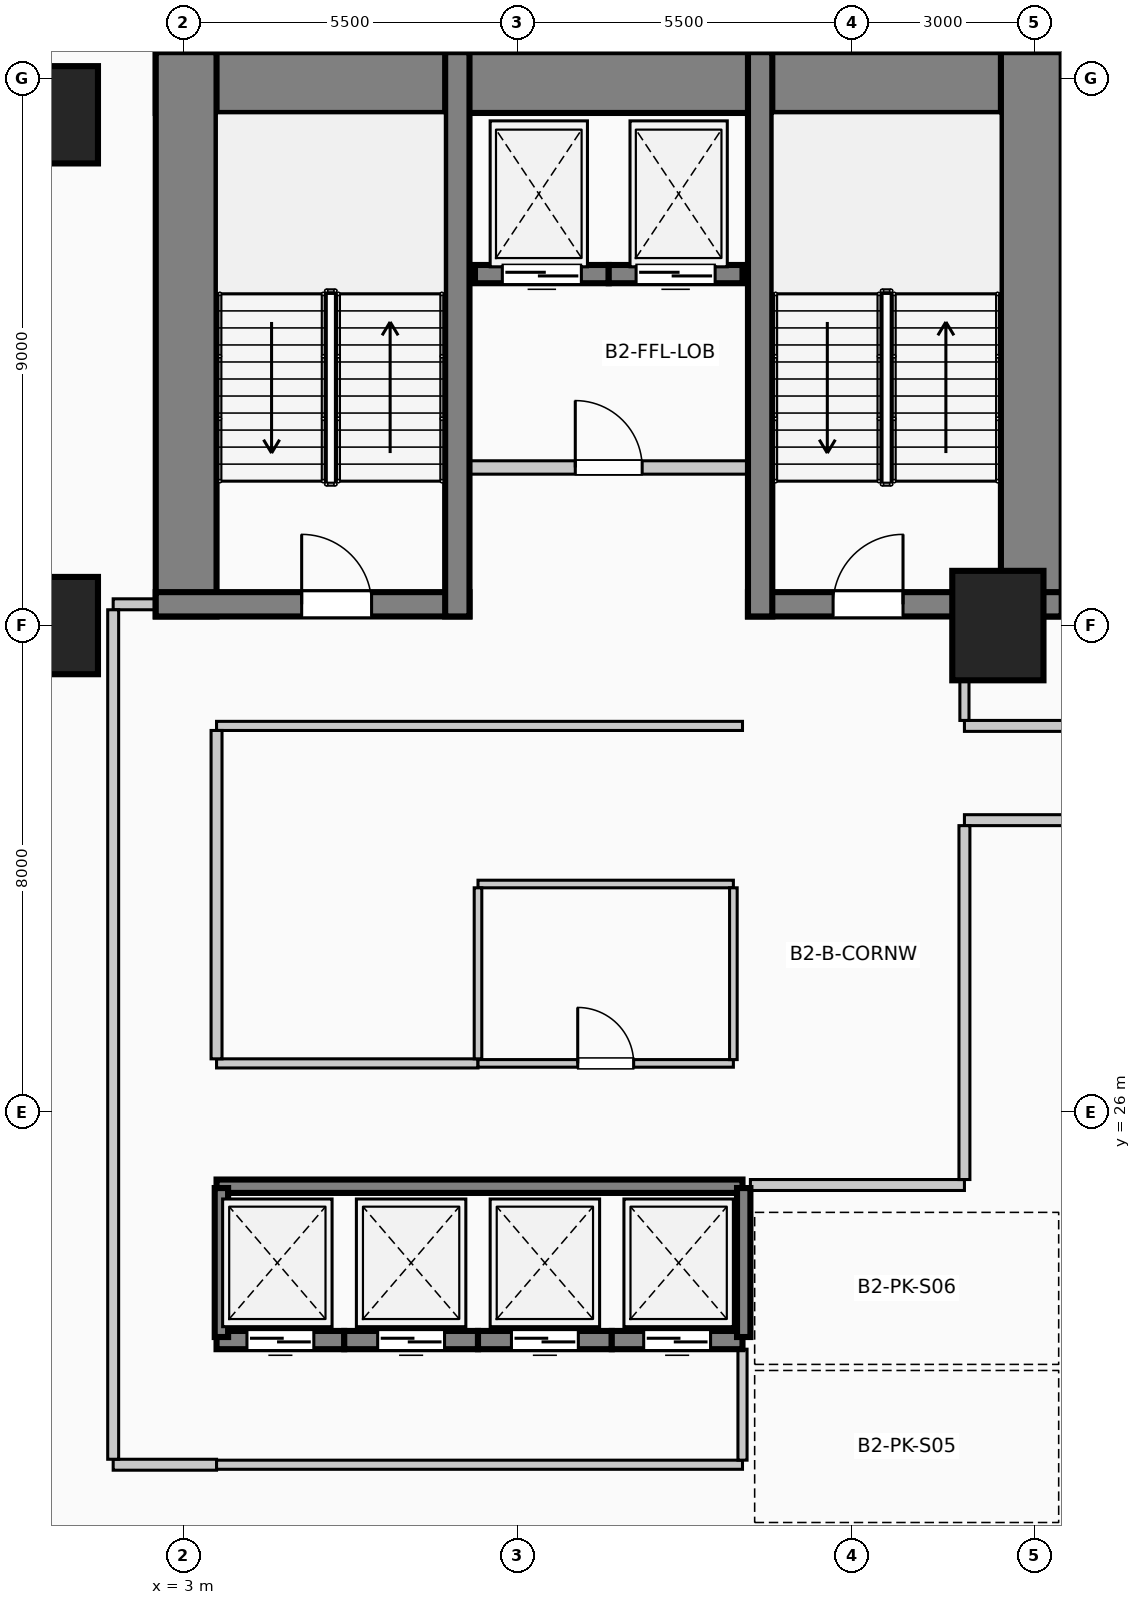
"""IFC4 building model, lengths in metres.
Left out: names, types, materials, properties, quantities, classifications, styles, units other than length and angle.
Written with IfcOpenShell. Run it as: python <this file> out.ifc"""

import sys

from ifc_helpers import new_model, si_unit, direction, frame, frame_2d, origin, origin_2d, place, context, subcontext, project, spatial, rectangle, extrude, element, fill, save


model = new_model("IFC4")
c1 = context("Model", 3, precision=1e-05, world=origin(), true_north=direction((0.0, 1.0)))
c2 = subcontext(c1, "Body", "Model", "MODEL_VIEW")
j1 = project(units=[si_unit("LENGTHUNIT", "METRE"), si_unit("PLANEANGLEUNIT", "RADIAN")], contexts=[c1])
p1 = place(None, origin())
s1 = spatial("IfcSite", under=j1, at=p1, CompositionType="ELEMENT")
p2 = place(p1, origin())
s2 = spatial("IfcBuilding", under=s1, at=p2, CompositionType="ELEMENT")
p3 = place(p2, frame((0.0, 0.0, -9.0)))
s3 = spatial("IfcBuildingStorey", under=s2, at=p3, CompositionType="ELEMENT", Elevation=-9.0)
p4 = place(p3, frame((2.55, 42.93, 0.0), z_axis=(0.0, 0.0, 1.0), x_axis=(1.0, 0.0, 0.0)))
e1 = element("IfcWall", 1, at=p4, inside=s3, PredefinedType="SHEAR", context=c2, shape_type="SweptSolid", body=[
    extrude(rectangle(XDim=14.9, YDim=1.0, at=frame_2d((7.45, 0.0))), origin(), (0.0, 0.0, 1.0), 4.5),
])
for number, where, z_axis, x_axis in (
    (2, (3.05, 34.15, 0.0), (0.0, 0.0, 1.0), (0.0, 1.0, 0.0)),
    (3, (16.95, 34.15, 0.0), (0.0, 0.0, 1.0), (0.0, 1.0, 0.0)),
):
    element("IfcWall", number, at=place(p3, frame(where, z_axis=z_axis, x_axis=x_axis)), inside=s3, PredefinedType="SHEAR", context=c2, shape_type="SweptSolid", body=[
        extrude(rectangle(XDim=9.28, YDim=1.0, at=frame_2d((4.64, 0.0))), origin(), (0.0, 0.0, 1.0), 4.5),
    ])
p5 = place(p3, frame((2.55, 34.35, 0.0), z_axis=(0.0, 0.0, 1.0), x_axis=(1.0, 0.0, 0.0)))
e4 = element("IfcWall", 4, at=p5, inside=s3, PredefinedType="SHEAR", context=c2, shape_type="SweptSolid", body=[
    extrude(rectangle(XDim=5.16, YDim=0.4, at=frame_2d((2.58, 0.0))), origin(), (0.0, 0.0, 1.0), 4.5),
])
p6 = place(p5, frame((2.4, 0.0, 0.0)))
e5 = element("IfcOpeningElement", 5, at=p6, cuts=e4, PredefinedType="OPENING", context=c2, shape_type="SweptSolid", body=[
    extrude(rectangle(XDim=1.15, YDim=2.2, at=frame_2d((0.575, 1.1))), frame((0.0, 0.21, 0.0), z_axis=(0.0, -1.0, 0.0), x_axis=(1.0, 0.0, 0.0)), (0.0, 0.0, 1.0), 0.42),
])
p7 = place(p3, frame((12.29, 34.35, 0.0), z_axis=(0.0, 0.0, 1.0), x_axis=(1.0, 0.0, 0.0)))
e6 = element("IfcWall", 6, at=p7, inside=s3, PredefinedType="SHEAR", context=c2, shape_type="SweptSolid", body=[
    extrude(rectangle(XDim=5.16, YDim=0.4, at=frame_2d((2.58, 0.0))), origin(), (0.0, 0.0, 1.0), 4.5),
])
p8 = place(p7, frame((1.4, 0.0, 0.0)))
e7 = element("IfcOpeningElement", 7, at=p8, cuts=e6, PredefinedType="OPENING", context=c2, shape_type="SweptSolid", body=[
    extrude(rectangle(XDim=1.15, YDim=2.2, at=frame_2d((0.575, 1.1))), frame((0.0, 0.21, 0.0), z_axis=(0.0, -1.0, 0.0), x_axis=(1.0, 0.0, 0.0)), (0.0, 0.0, 1.0), 0.42),
])
for number, where, z_axis, x_axis in (
    (8, (7.51, 34.15, 0.0), (0.0, 0.0, 1.0), (0.0, 1.0, 0.0)),
    (9, (12.49, 34.15, 0.0), (0.0, 0.0, 1.0), (0.0, 1.0, 0.0)),
):
    element("IfcWall", number, at=place(p3, frame(where, z_axis=z_axis, x_axis=x_axis)), inside=s3, PredefinedType="SHEAR", context=c2, shape_type="SweptSolid", body=[
        extrude(rectangle(XDim=9.28, YDim=0.4, at=frame_2d((4.64, 0.0))), origin(), (0.0, 0.0, 1.0), 4.5),
    ])
for number, where, z_axis, x_axis in (
    (10, (0.6, 34.0, 0.0), (0.0, 0.0, 1.0), (0.0, 1.0, 0.0)),
    (11, (0.6, 42.4, 0.0), (0.0, 0.0, 1.0), (0.0, 1.0, 0.0)),
):
    element("IfcColumn", number, at=place(p3, frame(where, z_axis=z_axis, x_axis=x_axis)), inside=s3, PredefinedType="COLUMN", context=c2, shape_type="SweptSolid", body=[
        extrude(rectangle(XDim=1.6, YDim=2.0, at=origin_2d()), origin(), (0.0, 0.0, 1.0), 4.5),
    ])
p9 = place(p3, frame((16.4, 34.0, 0.0), z_axis=(0.0, 0.0, 1.0), x_axis=(1.0, 0.0, 0.0)))
e12 = element("IfcColumn", 12, at=p9, inside=s3, PredefinedType="COLUMN", context=c2, shape_type="SweptSolid", body=[
    extrude(rectangle(XDim=1.5, YDim=1.8, at=origin_2d()), origin(), (0.0, 0.0, 1.0), 4.5),
])
p10 = place(p3, frame((5.65, 22.25, 0.0), z_axis=(0.0, 0.0, 1.0), x_axis=(-1.0, 0.0, 0.0)))
e13 = element("IfcWall", 13, at=p10, inside=s3, PredefinedType="SOLIDWALL", context=c2, shape_type="SweptSolid", body=[
    extrude(rectangle(XDim=2.1, YDim=0.3, at=frame_2d((1.05, 0.0))), origin(), (0.0, 0.0, 1.0), 4.5),
])
p11 = place(p10, frame((0.5, 0.0, 0.0)))
e14 = element("IfcOpeningElement", 14, at=p11, cuts=e13, PredefinedType="OPENING", context=c2, shape_type="SweptSolid", body=[
    extrude(rectangle(XDim=1.1, YDim=2.2, at=frame_2d((0.55, 1.1))), frame((0.0, 0.16, 0.0), z_axis=(0.0, -1.0, 0.0), x_axis=(1.0, 0.0, 0.0)), (0.0, 0.0, 1.0), 0.32),
])
p12 = place(p3, frame((7.85, 22.25, 0.0), z_axis=(0.0, 0.0, 1.0), x_axis=(-1.0, 0.0, 0.0)))
e15 = element("IfcWall", 15, at=p12, inside=s3, PredefinedType="SOLIDWALL", context=c2, shape_type="SweptSolid", body=[
    extrude(rectangle(XDim=2.2, YDim=0.3, at=frame_2d((1.1, 0.0))), origin(), (0.0, 0.0, 1.0), 4.5),
])
p13 = place(p12, frame((0.55, 0.0, 0.0)))
e16 = element("IfcOpeningElement", 16, at=p13, cuts=e15, PredefinedType="OPENING", context=c2, shape_type="SweptSolid", body=[
    extrude(rectangle(XDim=1.1, YDim=2.2, at=frame_2d((0.55, 1.1))), frame((0.0, 0.16, 0.0), z_axis=(0.0, -1.0, 0.0), x_axis=(1.0, 0.0, 0.0)), (0.0, 0.0, 1.0), 0.32),
])
p14 = place(p3, frame((10.05, 22.25, 0.0), z_axis=(0.0, 0.0, 1.0), x_axis=(-1.0, 0.0, 0.0)))
e17 = element("IfcWall", 17, at=p14, inside=s3, PredefinedType="SOLIDWALL", context=c2, shape_type="SweptSolid", body=[
    extrude(rectangle(XDim=2.2, YDim=0.3, at=frame_2d((1.1, 0.0))), origin(), (0.0, 0.0, 1.0), 4.5),
])
p15 = place(p14, frame((0.55, 0.0, 0.0)))
e18 = element("IfcOpeningElement", 18, at=p15, cuts=e17, PredefinedType="OPENING", context=c2, shape_type="SweptSolid", body=[
    extrude(rectangle(XDim=1.1, YDim=2.2, at=frame_2d((0.55, 1.1))), frame((0.0, 0.16, 0.0), z_axis=(0.0, -1.0, 0.0), x_axis=(1.0, 0.0, 0.0)), (0.0, 0.0, 1.0), 0.32),
])
p16 = place(p3, frame((12.2, 22.25, 0.0), z_axis=(0.0, 0.0, 1.0), x_axis=(-1.0, 0.0, 0.0)))
e19 = element("IfcWall", 19, at=p16, inside=s3, PredefinedType="SOLIDWALL", context=c2, shape_type="SweptSolid", body=[
    extrude(rectangle(XDim=2.15, YDim=0.3, at=frame_2d((1.075, 0.0))), origin(), (0.0, 0.0, 1.0), 4.5),
])
p17 = place(p16, frame((0.525, 0.0, 0.0)))
e20 = element("IfcOpeningElement", 20, at=p17, cuts=e19, PredefinedType="OPENING", context=c2, shape_type="SweptSolid", body=[
    extrude(rectangle(XDim=1.1, YDim=2.2, at=frame_2d((0.55, 1.1))), frame((0.0, 0.16, 0.0), z_axis=(0.0, -1.0, 0.0), x_axis=(1.0, 0.0, 0.0)), (0.0, 0.0, 1.0), 0.32),
])
p18 = place(p3, frame((10.0, 39.78, 0.0), z_axis=(0.0, 0.0, 1.0), x_axis=(-1.0, 0.0, 0.0)))
e21 = element("IfcWall", 21, at=p18, inside=s3, PredefinedType="SOLIDWALL", context=c2, shape_type="SweptSolid", body=[
    extrude(rectangle(XDim=2.2, YDim=0.3, at=frame_2d((1.1, 0.0))), origin(), (0.0, 0.0, 1.0), 4.5),
])
p19 = place(p18, frame((0.45, 0.0, 0.0)))
e22 = element("IfcOpeningElement", 22, at=p19, cuts=e21, PredefinedType="OPENING", context=c2, shape_type="SweptSolid", body=[
    extrude(rectangle(XDim=1.3, YDim=2.25, at=frame_2d((0.65, 1.125))), frame((0.0, 0.16, 0.0), z_axis=(0.0, -1.0, 0.0), x_axis=(1.0, 0.0, 0.0)), (0.0, 0.0, 1.0), 0.32),
])
p20 = place(p3, frame((12.2, 39.78, 0.0), z_axis=(0.0, 0.0, 1.0), x_axis=(-1.0, 0.0, 0.0)))
e23 = element("IfcWall", 23, at=p20, inside=s3, PredefinedType="SOLIDWALL", context=c2, shape_type="SweptSolid", body=[
    extrude(rectangle(XDim=2.2, YDim=0.3, at=frame_2d((1.1, 0.0))), origin(), (0.0, 0.0, 1.0), 4.5),
])
p21 = place(p20, frame((0.45, 0.0, 0.0)))
e24 = element("IfcOpeningElement", 24, at=p21, cuts=e23, PredefinedType="OPENING", context=c2, shape_type="SweptSolid", body=[
    extrude(rectangle(XDim=1.3, YDim=2.25, at=frame_2d((0.65, 1.125))), frame((0.0, 0.16, 0.0), z_axis=(0.0, -1.0, 0.0), x_axis=(1.0, 0.0, 0.0)), (0.0, 0.0, 1.0), 0.32),
])
p22 = place(p3, frame((3.55, 24.78, 0.0), z_axis=(0.0, 0.0, 1.0), x_axis=(1.0, 0.0, 0.0)))
e25 = element("IfcWall", 25, at=p22, inside=s3, PredefinedType="SOLIDWALL", context=c2, shape_type="SweptSolid", body=[
    extrude(rectangle(XDim=8.65, YDim=0.22, at=frame_2d((4.325, 0.0))), origin(), (0.0, 0.0, 1.0), 4.5),
])
for number, where, z_axis, x_axis in (
    (26, (3.63, 22.3, 0.0), (0.0, 0.0, 1.0), (0.0, 1.0, 0.0)),
    (27, (12.22, 22.3, 0.0), (0.0, 0.0, 1.0), (0.0, 1.0, 0.0)),
):
    element("IfcWall", number, at=place(p3, frame(where, z_axis=z_axis, x_axis=x_axis)), inside=s3, PredefinedType="SOLIDWALL", context=c2, shape_type="SweptSolid", body=[
        extrude(rectangle(XDim=2.45, YDim=0.22, at=frame_2d((1.225, 0.0))), origin(), (0.0, 0.0, 1.0), 4.5),
    ])
p23 = place(p3, frame((7.51, 36.6, 0.0), z_axis=(0.0, 0.0, 1.0), x_axis=(1.0, 0.0, 0.0)))
e28 = element("IfcWall", 28, at=p23, inside=s3, PredefinedType="PARTITIONING", context=c2, shape_type="SweptSolid", body=[
    extrude(rectangle(XDim=4.98, YDim=0.22, at=frame_2d((2.49, 0.0))), origin(), (0.0, 0.0, 1.0), 4.1),
])
p24 = place(p23, frame((1.94, 0.0, 0.0)))
e29 = element("IfcOpeningElement", 29, at=p24, cuts=e28, PredefinedType="OPENING", context=c2, shape_type="SweptSolid", body=[
    extrude(rectangle(XDim=1.1, YDim=2.2, at=frame_2d((0.55, 1.1))), frame((0.0, 0.12, 0.0), z_axis=(0.0, -1.0, 0.0), x_axis=(1.0, 0.0, 0.0)), (0.0, 0.0, 1.0), 0.24),
])
p25 = place(p3, frame((1.85, 20.2, 0.0), z_axis=(0.0, 0.0, 1.0), x_axis=(1.0, 0.0, 0.0)))
e30 = element("IfcWall", 30, at=p25, inside=s3, PredefinedType="PARTITIONING", context=c2, shape_type="SweptSolid", body=[
    extrude(rectangle(XDim=1.7, YDim=0.18, at=frame_2d((0.85, 0.0))), origin(), (0.0, 0.0, 1.0), 4.1),
])
p26 = place(p3, frame((3.55, 20.2, 0.0), z_axis=(0.0, 0.0, 1.0), x_axis=(1.0, 0.0, 0.0)))
e31 = element("IfcWall", 31, at=p26, inside=s3, PredefinedType="PARTITIONING", context=c2, shape_type="SweptSolid", body=[
    extrude(rectangle(XDim=8.65, YDim=0.15, at=frame_2d((4.325, 0.0))), origin(), (0.0, 0.0, 1.0), 4.1),
])
p27 = place(p3, frame((12.33, 24.8, 0.0), z_axis=(0.0, 0.0, 1.0), x_axis=(1.0, 0.0, 0.0)))
e32 = element("IfcWall", 32, at=p27, inside=s3, PredefinedType="PARTITIONING", context=c2, shape_type="SweptSolid", body=[
    extrude(rectangle(XDim=3.52, YDim=0.18, at=frame_2d((1.76, 0.0))), origin(), (0.0, 0.0, 1.0), 4.1),
])
p28 = place(p3, frame((3.55, 26.8, 0.0), z_axis=(0.0, 0.0, 1.0), x_axis=(1.0, 0.0, 0.0)))
e33 = element("IfcWall", 33, at=p28, inside=s3, PredefinedType="PARTITIONING", context=c2, shape_type="SweptSolid", body=[
    extrude(rectangle(XDim=4.3, YDim=0.15, at=frame_2d((2.15, 0.0))), origin(), (0.0, 0.0, 1.0), 4.1),
])
p29 = place(p3, frame((7.85, 26.8, 0.0), z_axis=(0.0, 0.0, 1.0), x_axis=(1.0, 0.0, 0.0)))
e34 = element("IfcWall", 34, at=p29, inside=s3, PredefinedType="PARTITIONING", context=c2, shape_type="SweptSolid", body=[
    extrude(rectangle(XDim=4.2, YDim=0.125, at=frame_2d((2.1, 0.0))), origin(), (0.0, 0.0, 1.0), 4.1),
])
p30 = place(p29, frame((1.64, 0.0, 0.0)))
e35 = element("IfcOpeningElement", 35, at=p30, cuts=e34, PredefinedType="OPENING", context=c2, shape_type="SweptSolid", body=[
    extrude(rectangle(XDim=0.92, YDim=2.1, at=frame_2d((0.46, 1.05))), frame((0.0, 0.073, 0.0), z_axis=(0.0, -1.0, 0.0), x_axis=(1.0, 0.0, 0.0)), (0.0, 0.0, 1.0), 0.145),
])
p31 = place(p3, frame((7.85, 29.75, 0.0), z_axis=(0.0, 0.0, 1.0), x_axis=(1.0, 0.0, 0.0)))
e36 = element("IfcWall", 36, at=p31, inside=s3, PredefinedType="PARTITIONING", context=c2, shape_type="SweptSolid", body=[
    extrude(rectangle(XDim=4.2, YDim=0.125, at=frame_2d((2.1, 0.0))), origin(), (0.0, 0.0, 1.0), 4.1),
])
p32 = place(p3, frame((15.85, 30.8, 0.0), z_axis=(0.0, 0.0, 1.0), x_axis=(1.0, 0.0, 0.0)))
e37 = element("IfcWall", 37, at=p32, inside=s3, PredefinedType="PARTITIONING", context=c2, shape_type="SweptSolid", body=[
    extrude(rectangle(XDim=29.7, YDim=0.18, at=frame_2d((14.85, 0.0))), origin(), (0.0, 0.0, 1.0), 4.1),
])
p33 = place(p3, frame((3.55, 32.35, 0.0), z_axis=(0.0, 0.0, 1.0), x_axis=(1.0, 0.0, 0.0)))
e38 = element("IfcWall", 38, at=p33, inside=s3, PredefinedType="PARTITIONING", context=c2, shape_type="SweptSolid", body=[
    extrude(rectangle(XDim=8.65, YDim=0.15, at=frame_2d((4.325, 0.0))), origin(), (0.0, 0.0, 1.0), 4.1),
])
p34 = place(p3, frame((15.85, 32.35, 0.0), z_axis=(0.0, 0.0, 1.0), x_axis=(1.0, 0.0, 0.0)))
e39 = element("IfcWall", 39, at=p34, inside=s3, PredefinedType="PARTITIONING", context=c2, shape_type="SweptSolid", body=[
    extrude(rectangle(XDim=1.7, YDim=0.18, at=frame_2d((0.85, 0.0))), origin(), (0.0, 0.0, 1.0), 4.1),
])
p35 = place(p3, frame((1.85, 34.35, 0.0), z_axis=(0.0, 0.0, 1.0), x_axis=(1.0, 0.0, 0.0)))
e40 = element("IfcWall", 40, at=p35, inside=s3, PredefinedType="PARTITIONING", context=c2, shape_type="SweptSolid", body=[
    extrude(rectangle(XDim=0.7, YDim=0.18, at=frame_2d((0.35, 0.0))), origin(), (0.0, 0.0, 1.0), 3.145),
])
p36 = place(p3, frame((1.85, 20.29, 0.0), z_axis=(0.0, 0.0, 1.0), x_axis=(0.0, 1.0, 0.0)))
e41 = element("IfcWall", 41, at=p36, inside=s3, PredefinedType="PARTITIONING", context=c2, shape_type="SweptSolid", body=[
    extrude(rectangle(XDim=13.97, YDim=0.18, at=frame_2d((6.985, 0.0))), origin(), (0.0, 0.0, 1.0), 4.1),
])
p37 = place(p3, frame((3.55, 26.875, 0.0), z_axis=(0.0, 0.0, 1.0), x_axis=(0.0, 1.0, 0.0)))
e42 = element("IfcWall", 42, at=p37, inside=s3, PredefinedType="PARTITIONING", context=c2, shape_type="SweptSolid", body=[
    extrude(rectangle(XDim=5.4, YDim=0.18, at=frame_2d((2.7, 0.0))), origin(), (0.0, 0.0, 1.0), 4.1),
])
p38 = place(p3, frame((7.85, 26.875, 0.0), z_axis=(0.0, 0.0, 1.0), x_axis=(0.0, 1.0, 0.0)))
e43 = element("IfcWall", 43, at=p38, inside=s3, PredefinedType="PARTITIONING", context=c2, shape_type="SweptSolid", body=[
    extrude(rectangle(XDim=2.812, YDim=0.125, at=frame_2d((1.406, 0.0))), origin(), (0.0, 0.0, 1.0), 4.1),
])
p39 = place(p3, frame((12.05, 26.863, 0.0), z_axis=(0.0, 0.0, 1.0), x_axis=(0.0, 1.0, 0.0)))
e44 = element("IfcWall", 44, at=p39, inside=s3, PredefinedType="PARTITIONING", context=c2, shape_type="SweptSolid", body=[
    extrude(rectangle(XDim=2.825, YDim=0.125, at=frame_2d((1.413, 0.0))), origin(), (0.0, 0.0, 1.0), 4.1),
])
p40 = place(p3, frame((12.2, 20.275, 0.0), z_axis=(0.0, 0.0, 1.0), x_axis=(0.0, 1.0, 0.0)))
e45 = element("IfcWall", 45, at=p40, inside=s3, PredefinedType="PARTITIONING", context=c2, shape_type="SweptSolid", body=[
    extrude(rectangle(XDim=1.825, YDim=0.15, at=frame_2d((0.913, 0.0))), origin(), (0.0, 0.0, 1.0), 4.1),
])
p41 = place(p3, frame((15.85, 24.89, 0.0), z_axis=(0.0, 0.0, 1.0), x_axis=(0.0, 1.0, 0.0)))
e46 = element("IfcWall", 46, at=p41, inside=s3, PredefinedType="PARTITIONING", context=c2, shape_type="SweptSolid", body=[
    extrude(rectangle(XDim=5.82, YDim=0.18, at=frame_2d((2.91, 0.0))), origin(), (0.0, 0.0, 1.0), 4.1),
])
p42 = place(p3, frame((15.85, 32.44, 0.0), z_axis=(0.0, 0.0, 1.0), x_axis=(0.0, 1.0, 0.0)))
e47 = element("IfcWall", 47, at=p42, inside=s3, PredefinedType="PARTITIONING", context=c2, shape_type="SweptSolid", body=[
    extrude(rectangle(XDim=0.66, YDim=0.15, at=frame_2d((0.33, 0.0))), origin(), (0.0, 0.0, 1.0), 4.1),
])
p43 = place(p11, origin())
e48 = element("IfcDoor", 48, at=p43, inside=s3, OperationType="SLIDING_TO_LEFT", PredefinedType="DOOR", context=c2, shape_type="SweptSolid", body=[
    extrude(rectangle(XDim=1.1, YDim=2.2, at=frame_2d((0.55, 1.1))), frame((0.0, 0.025, 0.0), z_axis=(0.0, -1.0, 0.0), x_axis=(1.0, 0.0, 0.0)), (0.0, 0.0, 1.0), 0.05),
])
fill(e14, e48)
p44 = place(p13, origin())
e49 = element("IfcDoor", 49, at=p44, inside=s3, OperationType="SLIDING_TO_RIGHT", PredefinedType="DOOR", context=c2, shape_type="SweptSolid", body=[
    extrude(rectangle(XDim=1.1, YDim=2.2, at=frame_2d((0.55, 1.1))), frame((0.0, 0.025, 0.0), z_axis=(0.0, -1.0, 0.0), x_axis=(1.0, 0.0, 0.0)), (0.0, 0.0, 1.0), 0.05),
])
fill(e16, e49)
p45 = place(p15, origin())
e50 = element("IfcDoor", 50, at=p45, inside=s3, OperationType="SLIDING_TO_LEFT", PredefinedType="DOOR", context=c2, shape_type="SweptSolid", body=[
    extrude(rectangle(XDim=1.1, YDim=2.2, at=frame_2d((0.55, 1.1))), frame((0.0, 0.025, 0.0), z_axis=(0.0, -1.0, 0.0), x_axis=(1.0, 0.0, 0.0)), (0.0, 0.0, 1.0), 0.05),
])
fill(e18, e50)
p46 = place(p17, origin())
e51 = element("IfcDoor", 51, at=p46, inside=s3, OperationType="SLIDING_TO_RIGHT", PredefinedType="DOOR", context=c2, shape_type="SweptSolid", body=[
    extrude(rectangle(XDim=1.1, YDim=2.2, at=frame_2d((0.55, 1.1))), frame((0.0, 0.025, 0.0), z_axis=(0.0, -1.0, 0.0), x_axis=(1.0, 0.0, 0.0)), (0.0, 0.0, 1.0), 0.05),
])
fill(e20, e51)
p47 = place(p19, origin())
e52 = element("IfcDoor", 52, at=p47, inside=s3, OperationType="SLIDING_TO_LEFT", PredefinedType="DOOR", context=c2, shape_type="SweptSolid", body=[
    extrude(rectangle(XDim=1.3, YDim=2.25, at=frame_2d((0.65, 1.125))), frame((0.0, 0.025, 0.0), z_axis=(0.0, -1.0, 0.0), x_axis=(1.0, 0.0, 0.0)), (0.0, 0.0, 1.0), 0.05),
])
fill(e22, e52)
p48 = place(p21, origin())
e53 = element("IfcDoor", 53, at=p48, inside=s3, OperationType="SLIDING_TO_RIGHT", PredefinedType="DOOR", context=c2, shape_type="SweptSolid", body=[
    extrude(rectangle(XDim=1.3, YDim=2.25, at=frame_2d((0.65, 1.125))), frame((0.0, 0.025, 0.0), z_axis=(0.0, -1.0, 0.0), x_axis=(1.0, 0.0, 0.0)), (0.0, 0.0, 1.0), 0.05),
])
fill(e24, e53)
p49 = place(p6, origin())
e54 = element("IfcDoor", 54, at=p49, inside=s3, OperationType="SINGLE_SWING_LEFT", PredefinedType="DOOR", context=c2, shape_type="SweptSolid", body=[
    extrude(rectangle(XDim=1.15, YDim=2.2, at=frame_2d((0.575, 1.1))), frame((0.0, 0.025, 0.0), z_axis=(0.0, -1.0, 0.0), x_axis=(1.0, 0.0, 0.0)), (0.0, 0.0, 1.0), 0.05),
])
fill(e5, e54)
p50 = place(p8, origin())
e55 = element("IfcDoor", 55, at=p50, inside=s3, OperationType="SINGLE_SWING_RIGHT", PredefinedType="DOOR", context=c2, shape_type="SweptSolid", body=[
    extrude(rectangle(XDim=1.15, YDim=2.2, at=frame_2d((0.575, 1.1))), frame((0.0, 0.025, 0.0), z_axis=(0.0, -1.0, 0.0), x_axis=(1.0, 0.0, 0.0)), (0.0, 0.0, 1.0), 0.05),
])
fill(e7, e55)
p51 = place(p24, origin())
e56 = element("IfcDoor", 56, at=p51, inside=s3, OperationType="SINGLE_SWING_LEFT", PredefinedType="DOOR", context=c2, shape_type="SweptSolid", body=[
    extrude(rectangle(XDim=1.1, YDim=2.2, at=frame_2d((0.55, 1.1))), frame((0.0, 0.025, 0.0), z_axis=(0.0, -1.0, 0.0), x_axis=(1.0, 0.0, 0.0)), (0.0, 0.0, 1.0), 0.05),
])
fill(e29, e56)
p52 = place(p30, origin())
e57 = element("IfcDoor", 57, at=p52, inside=s3, OperationType="SINGLE_SWING_LEFT", PredefinedType="DOOR", context=c2, shape_type="SweptSolid", body=[
    extrude(rectangle(XDim=0.92, YDim=2.1, at=frame_2d((0.46, 1.05))), frame((0.0, 0.025, 0.0), z_axis=(0.0, -1.0, 0.0), x_axis=(1.0, 0.0, 0.0)), (0.0, 0.0, 1.0), 0.05),
])
fill(e35, e57)
save(model, sys.argv[1])
